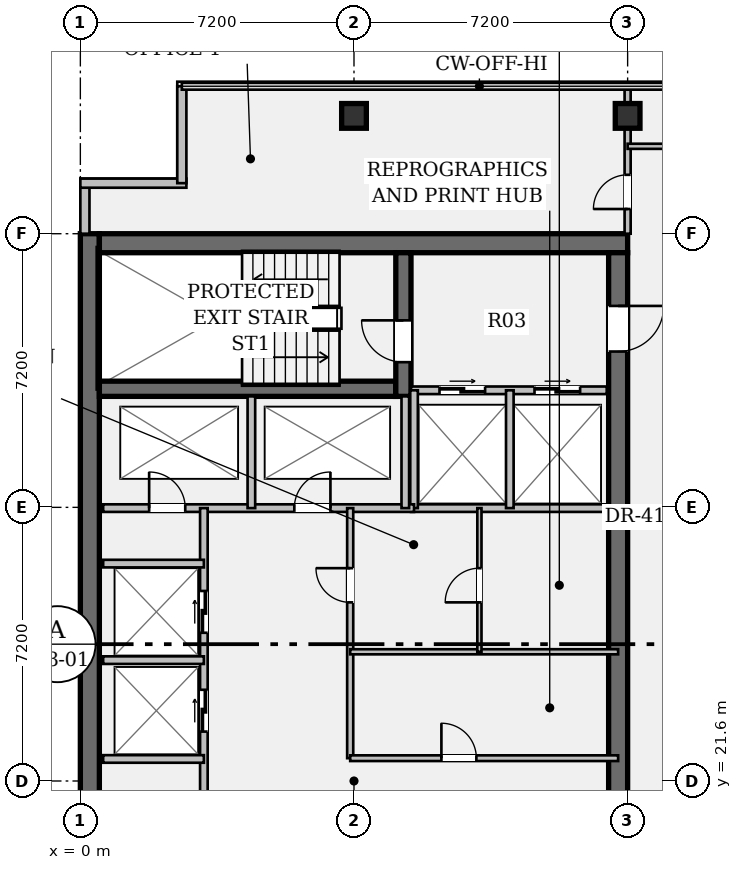
"""IFC4 building model, lengths in metres.
Left out: names, types, materials, properties, quantities, classifications, styles, units other than length and angle.
Written with IfcOpenShell. Run it as: python <this file> out.ifc"""

import sys

from ifc_helpers import new_model, si_unit, direction, frame, frame_2d, origin, origin_2d, place, context, subcontext, project, spatial, rectangle, hollow_rectangle, extrude, element, fill, save


model = new_model("IFC4")
c1 = context("Model", 3, precision=1e-05, world=origin(), true_north=direction((0.0, 1.0)))
c2 = subcontext(c1, "Body", "Model", "MODEL_VIEW")
j1 = project(units=[si_unit("LENGTHUNIT", "METRE"), si_unit("PLANEANGLEUNIT", "RADIAN")], contexts=[c1])
p1 = place(None, origin())
s1 = spatial("IfcSite", under=j1, at=p1, CompositionType="ELEMENT")
p2 = place(p1, origin())
s2 = spatial("IfcBuilding", under=s1, at=p2, CompositionType="ELEMENT")
p3 = place(p2, frame((0.0, 0.0, 258.65)))
s3 = spatial("IfcBuildingStorey", under=s2, at=p3, CompositionType="ELEMENT", Elevation=258.65)
p4 = place(p3, frame((0.25, 7.2, 0.0), z_axis=(0.0, 0.0, 1.0), x_axis=(0.0, 1.0, 0.0)))
e1 = element("IfcWall", 1, at=p4, inside=s3, PredefinedType="SHEAR", context=c2, shape_type="SweptSolid", body=[
    extrude(rectangle(XDim=28.8, YDim=0.5, at=frame_2d((14.4, 0.0))), origin(), (0.0, 0.0, 1.0), 3.24),
])
p5 = place(p3, frame((0.5, 35.75, 0.0), z_axis=(0.0, 0.0, 1.0), x_axis=(1.0, 0.0, 0.0)))
e2 = element("IfcWall", 2, at=p5, inside=s3, PredefinedType="SHEAR", context=c2, shape_type="SweptSolid", body=[
    extrude(rectangle(XDim=13.9, YDim=0.5, at=frame_2d((6.95, 0.0))), origin(), (0.0, 0.0, 1.0), 3.24),
])
p6 = place(p3, frame((14.15, 35.5, 0.0), z_axis=(0.0, 0.0, 1.0), x_axis=(0.0, -1.0, 0.0)))
e3 = element("IfcWall", 3, at=p6, inside=s3, PredefinedType="SHEAR", context=c2, shape_type="SweptSolid", body=[
    extrude(rectangle(XDim=27.8, YDim=0.5, at=frame_2d((13.9, 0.0))), origin(), (0.0, 0.0, 1.0), 3.24),
])
p7 = place(p6, frame((1.4, 0.0, 0.0)))
e4 = element("IfcOpeningElement", 4, at=p7, cuts=e3, PredefinedType="OPENING", context=c2, shape_type="SweptSolid", body=[
    extrude(rectangle(XDim=1.2, YDim=2.15, at=frame_2d((0.6, 1.075))), frame((0.0, 0.262, 0.0), z_axis=(0.0, -1.0, 0.0), x_axis=(1.0, 0.0, 0.0)), (0.0, 0.0, 1.0), 0.524),
])
p8 = place(p6, frame((25.35, 0.0, 0.0)))
e5 = element("IfcOpeningElement", 5, at=p8, cuts=e3, PredefinedType="OPENING", context=c2, shape_type="SweptSolid", body=[
    extrude(rectangle(XDim=1.2, YDim=2.15, at=frame_2d((0.6, 1.075))), frame((0.0, 0.262, 0.0), z_axis=(0.0, -1.0, 0.0), x_axis=(1.0, 0.0, 0.0)), (0.0, 0.0, 1.0), 0.524),
])
p9 = place(p6, frame((14.7, 0.0, 0.0)))
e6 = element("IfcOpeningElement", 6, at=p9, cuts=e3, PredefinedType="OPENING", context=c2, shape_type="SweptSolid", body=[
    extrude(rectangle(XDim=1.6, YDim=2.2, at=frame_2d((0.8, 1.1))), frame((0.0, 0.262, 0.0), z_axis=(0.0, -1.0, 0.0), x_axis=(1.0, 0.0, 0.0)), (0.0, 0.0, 1.0), 0.524),
])
p10 = place(p3, frame((0.5, 31.92, 0.0), z_axis=(0.0, 0.0, 1.0), x_axis=(1.0, 0.0, 0.0)))
e7 = element("IfcWall", 7, at=p10, inside=s3, PredefinedType="SHEAR", context=c2, shape_type="SweptSolid", body=[
    extrude(rectangle(XDim=7.8, YDim=0.4, at=frame_2d((3.9, 0.0))), origin(), (0.0, 0.0, 1.0), 3.24),
])
p11 = place(p3, frame((8.5, 31.72, 0.0), z_axis=(0.0, 0.0, 1.0), x_axis=(0.0, 1.0, 0.0)))
e8 = element("IfcWall", 8, at=p11, inside=s3, PredefinedType="SHEAR", context=c2, shape_type="SweptSolid", body=[
    extrude(rectangle(XDim=3.78, YDim=0.4, at=frame_2d((1.89, 0.0))), origin(), (0.0, 0.0, 1.0), 3.24),
])
p12 = place(p11, frame((0.9, 0.0, 0.0)))
e9 = element("IfcOpeningElement", 9, at=p12, cuts=e8, PredefinedType="OPENING", context=c2, shape_type="SweptSolid", body=[
    extrude(rectangle(XDim=1.1, YDim=2.15, at=frame_2d((0.55, 1.075))), frame((0.0, 0.212, 0.0), z_axis=(0.0, -1.0, 0.0), x_axis=(1.0, 0.0, 0.0)), (0.0, 0.0, 1.0), 0.424),
])
for number, where, z_axis, x_axis in (
    (10, (7.2, 39.1, 0.0), (0.0, 0.0, 1.0), (1.0, 0.0, 0.0)),
    (11, (14.4, 39.1, 0.0), (0.0, 0.0, 1.0), (1.0, 0.0, 0.0)),
):
    element("IfcColumn", number, at=place(p3, frame(where, z_axis=z_axis, x_axis=x_axis)), inside=s3, PredefinedType="COLUMN", context=c2, shape_type="SweptSolid", body=[
        extrude(hollow_rectangle(XDim=0.65, YDim=0.65, WallThickness=0.04, at=origin_2d()), origin(), (0.0, 0.0, 1.0), 3.24),
    ])
p13 = place(p3, frame((0.12, 36.0, 0.0), z_axis=(0.0, 0.0, 1.0), x_axis=(0.0, 1.0, 0.0)))
e12 = element("IfcWall", 12, at=p13, inside=s3, PredefinedType="STANDARD", context=c2, shape_type="SweptSolid", body=[
    extrude(rectangle(XDim=1.33, YDim=0.24, at=frame_2d((0.665, 0.0))), origin(), (0.0, 0.0, 1.0), 3.24),
])
p14 = place(p3, frame((0.0, 37.33, 0.0), z_axis=(0.0, 0.0, 1.0), x_axis=(1.0, 0.0, 0.0)))
e13 = element("IfcWall", 13, at=p14, inside=s3, PredefinedType="STANDARD", context=c2, shape_type="SweptSolid", body=[
    extrude(rectangle(XDim=2.79, YDim=0.24, at=frame_2d((1.395, 0.0))), origin(), (0.0, 0.0, 1.0), 3.24),
])
p15 = place(p3, frame((2.67, 37.33, 0.0), z_axis=(0.0, 0.0, 1.0), x_axis=(0.0, 1.0, 0.0)))
e14 = element("IfcWall", 14, at=p15, inside=s3, PredefinedType="STANDARD", context=c2, shape_type="SweptSolid", body=[
    extrude(rectangle(XDim=2.55, YDim=0.24, at=frame_2d((1.275, 0.0))), origin(), (0.0, 0.0, 1.0), 3.24),
])
p16 = place(p3, frame((8.7, 31.88, 0.0), z_axis=(0.0, 0.0, 1.0), x_axis=(1.0, 0.0, 0.0)))
e15 = element("IfcWall", 15, at=p16, inside=s3, PredefinedType="PARTITIONING", context=c2, shape_type="SweptSolid", body=[
    extrude(rectangle(XDim=5.15, YDim=0.2, at=frame_2d((2.575, 0.0))), origin(), (0.0, 0.0, 1.0), 3.24),
])
p17 = place(p16, frame((0.75, 0.0, 0.0)))
e16 = element("IfcOpeningElement", 16, at=p17, cuts=e15, PredefinedType="OPENING", context=c2, shape_type="SweptSolid", body=[
    extrude(rectangle(XDim=1.2, YDim=2.2, at=frame_2d((0.6, 1.1))), frame((0.0, 0.112, 0.0), z_axis=(0.0, -1.0, 0.0), x_axis=(1.0, 0.0, 0.0)), (0.0, 0.0, 1.0), 0.224),
])
p18 = place(p16, frame((3.25, 0.0, 0.0)))
e17 = element("IfcOpeningElement", 17, at=p18, cuts=e15, PredefinedType="OPENING", context=c2, shape_type="SweptSolid", body=[
    extrude(rectangle(XDim=1.2, YDim=2.2, at=frame_2d((0.6, 1.1))), frame((0.0, 0.112, 0.0), z_axis=(0.0, -1.0, 0.0), x_axis=(1.0, 0.0, 0.0)), (0.0, 0.0, 1.0), 0.224),
])
p19 = place(p3, frame((8.7, 28.78, 0.0), z_axis=(0.0, 0.0, 1.0), x_axis=(1.0, 0.0, 0.0)))
e18 = element("IfcWall", 18, at=p19, inside=s3, PredefinedType="PARTITIONING", context=c2, shape_type="SweptSolid", body=[
    extrude(rectangle(XDim=5.15, YDim=0.2, at=frame_2d((2.575, 0.0))), origin(), (0.0, 0.0, 1.0), 3.24),
])
for number, where, z_axis, x_axis in (
    (19, (8.78, 28.78, 0.0), (0.0, 0.0, 1.0), (0.0, 1.0, 0.0)),
    (20, (11.3, 28.78, 0.0), (0.0, 0.0, 1.0), (0.0, 1.0, 0.0)),
):
    element("IfcWall", number, at=place(p3, frame(where, z_axis=z_axis, x_axis=x_axis)), inside=s3, PredefinedType="PARTITIONING", context=c2, shape_type="SweptSolid", body=[
        extrude(rectangle(XDim=3.1, YDim=0.2, at=frame_2d((1.55, 0.0))), origin(), (0.0, 0.0, 1.0), 3.24),
    ])
p20 = place(p3, frame((0.6, 28.78, 0.0), z_axis=(0.0, 0.0, 1.0), x_axis=(1.0, 0.0, 0.0)))
e21 = element("IfcWall", 21, at=p20, inside=s3, PredefinedType="PARTITIONING", context=c2, shape_type="SweptSolid", body=[
    extrude(rectangle(XDim=8.18, YDim=0.2, at=frame_2d((4.09, 0.0))), origin(), (0.0, 0.0, 1.0), 3.24),
])
p21 = place(p20, frame((1.21, 0.0, 0.0)))
e22 = element("IfcOpeningElement", 22, at=p21, cuts=e21, PredefinedType="OPENING", context=c2, shape_type="SweptSolid", body=[
    extrude(rectangle(XDim=0.95, YDim=2.15, at=frame_2d((0.475, 1.075))), frame((0.0, 0.112, 0.0), z_axis=(0.0, -1.0, 0.0), x_axis=(1.0, 0.0, 0.0)), (0.0, 0.0, 1.0), 0.224),
])
p22 = place(p20, frame((5.03, 0.0, 0.0)))
e23 = element("IfcOpeningElement", 23, at=p22, cuts=e21, PredefinedType="OPENING", context=c2, shape_type="SweptSolid", body=[
    extrude(rectangle(XDim=0.95, YDim=2.15, at=frame_2d((0.475, 1.075))), frame((0.0, 0.112, 0.0), z_axis=(0.0, -1.0, 0.0), x_axis=(1.0, 0.0, 0.0)), (0.0, 0.0, 1.0), 0.224),
])
for number, where, z_axis, x_axis in (
    (24, (4.5, 28.78, 0.0), (0.0, 0.0, 1.0), (0.0, 1.0, 0.0)),
    (25, (8.55, 28.78, 0.0), (0.0, 0.0, 1.0), (0.0, 1.0, 0.0)),
):
    element("IfcWall", number, at=place(p3, frame(where, z_axis=z_axis, x_axis=x_axis)), inside=s3, PredefinedType="PARTITIONING", context=c2, shape_type="SweptSolid", body=[
        extrude(rectangle(XDim=2.94, YDim=0.2, at=frame_2d((1.47, 0.0))), origin(), (0.0, 0.0, 1.0), 3.24),
    ])
p23 = place(p3, frame((3.25, 15.7, 0.0), z_axis=(0.0, 0.0, 1.0), x_axis=(0.0, 1.0, 0.0)))
e26 = element("IfcWall", 26, at=p23, inside=s3, PredefinedType="PARTITIONING", context=c2, shape_type="SweptSolid", body=[
    extrude(rectangle(XDim=13.08, YDim=0.2, at=frame_2d((6.54, 0.0))), origin(), (0.0, 0.0, 1.0), 3.24),
])
p24 = place(p23, frame((0.9, 0.0, 0.0)))
e27 = element("IfcOpeningElement", 27, at=p24, cuts=e26, PredefinedType="OPENING", context=c2, shape_type="SweptSolid", body=[
    extrude(rectangle(XDim=1.1, YDim=2.2, at=frame_2d((0.55, 1.1))), frame((0.0, 0.112, 0.0), z_axis=(0.0, -1.0, 0.0), x_axis=(1.0, 0.0, 0.0)), (0.0, 0.0, 1.0), 0.224),
])
p25 = place(p23, frame((3.5, 0.0, 0.0)))
e28 = element("IfcOpeningElement", 28, at=p25, cuts=e26, PredefinedType="OPENING", context=c2, shape_type="SweptSolid", body=[
    extrude(rectangle(XDim=1.1, YDim=2.2, at=frame_2d((0.55, 1.1))), frame((0.0, 0.112, 0.0), z_axis=(0.0, -1.0, 0.0), x_axis=(1.0, 0.0, 0.0)), (0.0, 0.0, 1.0), 0.224),
])
p26 = place(p23, frame((7.2, 0.0, 0.0)))
e29 = element("IfcOpeningElement", 29, at=p26, cuts=e26, PredefinedType="OPENING", context=c2, shape_type="SweptSolid", body=[
    extrude(rectangle(XDim=1.1, YDim=2.2, at=frame_2d((0.55, 1.1))), frame((0.0, 0.112, 0.0), z_axis=(0.0, -1.0, 0.0), x_axis=(1.0, 0.0, 0.0)), (0.0, 0.0, 1.0), 0.224),
])
p27 = place(p23, frame((9.8, 0.0, 0.0)))
e30 = element("IfcOpeningElement", 30, at=p27, cuts=e26, PredefinedType="OPENING", context=c2, shape_type="SweptSolid", body=[
    extrude(rectangle(XDim=1.1, YDim=2.2, at=frame_2d((0.55, 1.1))), frame((0.0, 0.112, 0.0), z_axis=(0.0, -1.0, 0.0), x_axis=(1.0, 0.0, 0.0)), (0.0, 0.0, 1.0), 0.224),
])
for number, where, z_axis, x_axis in (
    (31, (0.6, 22.18, 0.0), (0.0, 0.0, 1.0), (1.0, 0.0, 0.0)),
    (32, (0.6, 24.78, 0.0), (0.0, 0.0, 1.0), (1.0, 0.0, 0.0)),
    (33, (0.6, 27.32, 0.0), (0.0, 0.0, 1.0), (1.0, 0.0, 0.0)),
):
    element("IfcWall", number, at=place(p3, frame(where, z_axis=z_axis, x_axis=x_axis)), inside=s3, PredefinedType="PARTITIONING", context=c2, shape_type="SweptSolid", body=[
        extrude(rectangle(XDim=2.65, YDim=0.2, at=frame_2d((1.325, 0.0))), origin(), (0.0, 0.0, 1.0), 3.24),
    ])
p28 = place(p3, frame((7.1, 22.2, 0.0), z_axis=(0.0, 0.0, 1.0), x_axis=(0.0, 1.0, 0.0)))
e34 = element("IfcWall", 34, at=p28, inside=s3, PredefinedType="PARTITIONING", context=c2, shape_type="SweptSolid", body=[
    extrude(rectangle(XDim=6.58, YDim=0.16, at=frame_2d((3.29, 0.0))), origin(), (0.0, 0.0, 1.0), 3.24),
])
p29 = place(p28, frame((4.1, 0.0, 0.0)))
e35 = element("IfcOpeningElement", 35, at=p29, cuts=e34, PredefinedType="OPENING", context=c2, shape_type="SweptSolid", body=[
    extrude(rectangle(XDim=0.9, YDim=2.15, at=frame_2d((0.45, 1.075))), frame((0.0, 0.092, 0.0), z_axis=(0.0, -1.0, 0.0), x_axis=(1.0, 0.0, 0.0)), (0.0, 0.0, 1.0), 0.184),
])
p30 = place(p3, frame((7.1, 22.2, 0.0), z_axis=(0.0, 0.0, 1.0), x_axis=(1.0, 0.0, 0.0)))
e36 = element("IfcWall", 36, at=p30, inside=s3, PredefinedType="PARTITIONING", context=c2, shape_type="SweptSolid", body=[
    extrude(rectangle(XDim=7.05, YDim=0.15, at=frame_2d((3.525, 0.0))), origin(), (0.0, 0.0, 1.0), 3.24),
])
p31 = place(p30, frame((2.4, 0.0, 0.0)))
e37 = element("IfcOpeningElement", 37, at=p31, cuts=e36, PredefinedType="OPENING", context=c2, shape_type="SweptSolid", body=[
    extrude(rectangle(XDim=0.92, YDim=2.15, at=frame_2d((0.46, 1.075))), frame((0.0, 0.087, 0.0), z_axis=(0.0, -1.0, 0.0), x_axis=(1.0, 0.0, 0.0)), (0.0, 0.0, 1.0), 0.174),
])
p32 = place(p3, frame((7.1, 25.0, 0.0), z_axis=(0.0, 0.0, 1.0), x_axis=(1.0, 0.0, 0.0)))
e38 = element("IfcWall", 38, at=p32, inside=s3, PredefinedType="PARTITIONING", context=c2, shape_type="SweptSolid", body=[
    extrude(rectangle(XDim=7.05, YDim=0.135, at=frame_2d((3.525, 0.0))), origin(), (0.0, 0.0, 1.0), 3.24),
])
p33 = place(p3, frame((10.5, 25.0, 0.0), z_axis=(0.0, 0.0, 1.0), x_axis=(0.0, 1.0, 0.0)))
e39 = element("IfcWall", 39, at=p33, inside=s3, PredefinedType="PARTITIONING", context=c2, shape_type="SweptSolid", body=[
    extrude(rectangle(XDim=3.78, YDim=0.11, at=frame_2d((1.89, 0.0))), origin(), (0.0, 0.0, 1.0), 3.24),
])
p34 = place(p33, frame((1.3, 0.0, 0.0)))
e40 = element("IfcOpeningElement", 40, at=p34, cuts=e39, PredefinedType="OPENING", context=c2, shape_type="SweptSolid", body=[
    extrude(rectangle(XDim=0.9, YDim=2.15, at=frame_2d((0.45, 1.075))), frame((0.0, 0.067, 0.0), z_axis=(0.0, -1.0, 0.0), x_axis=(1.0, 0.0, 0.0)), (0.0, 0.0, 1.0), 0.134),
])
p35 = place(p3, frame((14.4, 36.0, 0.0), z_axis=(0.0, 0.0, 1.0), x_axis=(0.0, 1.0, 0.0)))
e41 = element("IfcWall", 41, at=p35, inside=s3, PredefinedType="PARTITIONING", context=c2, shape_type="SweptSolid", body=[
    extrude(rectangle(XDim=3.88, YDim=0.16, at=frame_2d((1.94, 0.0))), origin(), (0.0, 0.0, 1.0), 2.676),
])
p36 = place(p35, frame((0.65, 0.0, 0.0)))
e42 = element("IfcOpeningElement", 42, at=p36, cuts=e41, PredefinedType="OPENING", context=c2, shape_type="SweptSolid", body=[
    extrude(rectangle(XDim=0.9, YDim=2.15, at=frame_2d((0.45, 1.075))), frame((0.0, 0.092, 0.0), z_axis=(0.0, -1.0, 0.0), x_axis=(1.0, 0.0, 0.0)), (0.0, 0.0, 1.0), 0.184),
])
p37 = place(p3, frame((14.4, 38.3, 0.0), z_axis=(0.0, 0.0, 1.0), x_axis=(1.0, 0.0, 0.0)))
e43 = element("IfcWall", 43, at=p37, inside=s3, PredefinedType="PARTITIONING", context=c2, shape_type="SweptSolid", body=[
    extrude(rectangle(XDim=2.95, YDim=0.135, at=frame_2d((1.475, 0.0))), origin(), (0.0, 0.0, 1.0), 3.24),
])
p38 = place(p37, frame((1.54, 0.0, 0.0)))
e44 = element("IfcOpeningElement", 44, at=p38, cuts=e43, PredefinedType="OPENING", context=c2, shape_type="SweptSolid", body=[
    extrude(rectangle(XDim=0.92, YDim=2.15, at=frame_2d((0.46, 1.075))), frame((0.0, 0.08, 0.0), z_axis=(0.0, -1.0, 0.0), x_axis=(1.0, 0.0, 0.0)), (0.0, 0.0, 1.0), 0.159),
])
p39 = place(p12, origin())
e45 = element("IfcDoor", 45, at=p39, inside=s3, OperationType="SINGLE_SWING_RIGHT", PredefinedType="DOOR", context=c2, shape_type="SweptSolid", body=[
    extrude(rectangle(XDim=1.1, YDim=2.15, at=frame_2d((0.55, 1.075))), frame((0.0, 0.025, 0.0), z_axis=(0.0, -1.0, 0.0), x_axis=(1.0, 0.0, 0.0)), (0.0, 0.0, 1.0), 0.05),
])
fill(e9, e45)
p40 = place(p7, origin())
e46 = element("IfcDoor", 46, at=p40, inside=s3, OperationType="SINGLE_SWING_LEFT", PredefinedType="DOOR", context=c2, shape_type="SweptSolid", body=[
    extrude(rectangle(XDim=1.2, YDim=2.15, at=frame_2d((0.6, 1.075))), frame((0.0, 0.025, 0.0), z_axis=(0.0, -1.0, 0.0), x_axis=(1.0, 0.0, 0.0)), (0.0, 0.0, 1.0), 0.05),
])
fill(e4, e46)
p41 = place(p17, origin())
e47 = element("IfcDoor", 47, at=p41, inside=s3, OperationType="DOUBLE_DOOR_SLIDING", PredefinedType="DOOR", context=c2, shape_type="SweptSolid", body=[
    extrude(rectangle(XDim=1.2, YDim=2.2, at=frame_2d((0.6, 1.1))), frame((0.0, 0.025, 0.0), z_axis=(0.0, -1.0, 0.0), x_axis=(1.0, 0.0, 0.0)), (0.0, 0.0, 1.0), 0.05),
])
fill(e16, e47)
p42 = place(p18, origin())
e48 = element("IfcDoor", 48, at=p42, inside=s3, OperationType="DOUBLE_DOOR_SLIDING", PredefinedType="DOOR", context=c2, shape_type="SweptSolid", body=[
    extrude(rectangle(XDim=1.2, YDim=2.2, at=frame_2d((0.6, 1.1))), frame((0.0, 0.025, 0.0), z_axis=(0.0, -1.0, 0.0), x_axis=(1.0, 0.0, 0.0)), (0.0, 0.0, 1.0), 0.05),
])
fill(e17, e48)
p43 = place(p21, origin())
e49 = element("IfcDoor", 49, at=p43, inside=s3, OperationType="SINGLE_SWING_LEFT", PredefinedType="DOOR", context=c2, shape_type="SweptSolid", body=[
    extrude(rectangle(XDim=0.95, YDim=2.15, at=frame_2d((0.475, 1.075))), frame((0.0, 0.025, 0.0), z_axis=(0.0, -1.0, 0.0), x_axis=(1.0, 0.0, 0.0)), (0.0, 0.0, 1.0), 0.05),
])
fill(e22, e49)
p44 = place(p22, origin())
e50 = element("IfcDoor", 50, at=p44, inside=s3, OperationType="SINGLE_SWING_RIGHT", PredefinedType="DOOR", context=c2, shape_type="SweptSolid", body=[
    extrude(rectangle(XDim=0.95, YDim=2.15, at=frame_2d((0.475, 1.075))), frame((0.0, 0.025, 0.0), z_axis=(0.0, -1.0, 0.0), x_axis=(1.0, 0.0, 0.0)), (0.0, 0.0, 1.0), 0.05),
])
fill(e23, e50)
p45 = place(p26, origin())
e51 = element("IfcDoor", 51, at=p45, inside=s3, OperationType="DOUBLE_DOOR_SLIDING", PredefinedType="DOOR", context=c2, shape_type="SweptSolid", body=[
    extrude(rectangle(XDim=1.1, YDim=2.2, at=frame_2d((0.55, 1.1))), frame((0.0, 0.025, 0.0), z_axis=(0.0, -1.0, 0.0), x_axis=(1.0, 0.0, 0.0)), (0.0, 0.0, 1.0), 0.05),
])
fill(e29, e51)
p46 = place(p27, origin())
e52 = element("IfcDoor", 52, at=p46, inside=s3, OperationType="DOUBLE_DOOR_SLIDING", PredefinedType="DOOR", context=c2, shape_type="SweptSolid", body=[
    extrude(rectangle(XDim=1.1, YDim=2.2, at=frame_2d((0.55, 1.1))), frame((0.0, 0.025, 0.0), z_axis=(0.0, -1.0, 0.0), x_axis=(1.0, 0.0, 0.0)), (0.0, 0.0, 1.0), 0.05),
])
fill(e30, e52)
p47 = place(p31, origin())
e53 = element("IfcDoor", 53, at=p47, inside=s3, OperationType="SINGLE_SWING_LEFT", PredefinedType="DOOR", context=c2, shape_type="SweptSolid", body=[
    extrude(rectangle(XDim=0.92, YDim=2.15, at=frame_2d((0.46, 1.075))), frame((0.0, 0.025, 0.0), z_axis=(0.0, -1.0, 0.0), x_axis=(1.0, 0.0, 0.0)), (0.0, 0.0, 1.0), 0.05),
])
fill(e37, e53)
p48 = place(p29, origin())
e54 = element("IfcDoor", 54, at=p48, inside=s3, OperationType="SINGLE_SWING_RIGHT", PredefinedType="DOOR", context=c2, shape_type="SweptSolid", body=[
    extrude(rectangle(XDim=0.9, YDim=2.15, at=frame_2d((0.45, 1.075))), frame((0.0, 0.025, 0.0), z_axis=(0.0, -1.0, 0.0), x_axis=(1.0, 0.0, 0.0)), (0.0, 0.0, 1.0), 0.05),
])
fill(e35, e54)
p49 = place(p34, origin())
e55 = element("IfcDoor", 55, at=p49, inside=s3, OperationType="SINGLE_SWING_LEFT", PredefinedType="DOOR", context=c2, shape_type="SweptSolid", body=[
    extrude(rectangle(XDim=0.9, YDim=2.15, at=frame_2d((0.45, 1.075))), frame((0.0, 0.025, 0.0), z_axis=(0.0, -1.0, 0.0), x_axis=(1.0, 0.0, 0.0)), (0.0, 0.0, 1.0), 0.05),
])
fill(e40, e55)
p50 = place(p36, origin())
e56 = element("IfcDoor", 56, at=p50, inside=s3, OperationType="SINGLE_SWING_LEFT", PredefinedType="DOOR", context=c2, shape_type="SweptSolid", body=[
    extrude(rectangle(XDim=0.9, YDim=2.15, at=frame_2d((0.45, 1.075))), frame((0.0, 0.025, 0.0), z_axis=(0.0, -1.0, 0.0), x_axis=(1.0, 0.0, 0.0)), (0.0, 0.0, 1.0), 0.05),
])
fill(e42, e56)
save(model, sys.argv[1])
